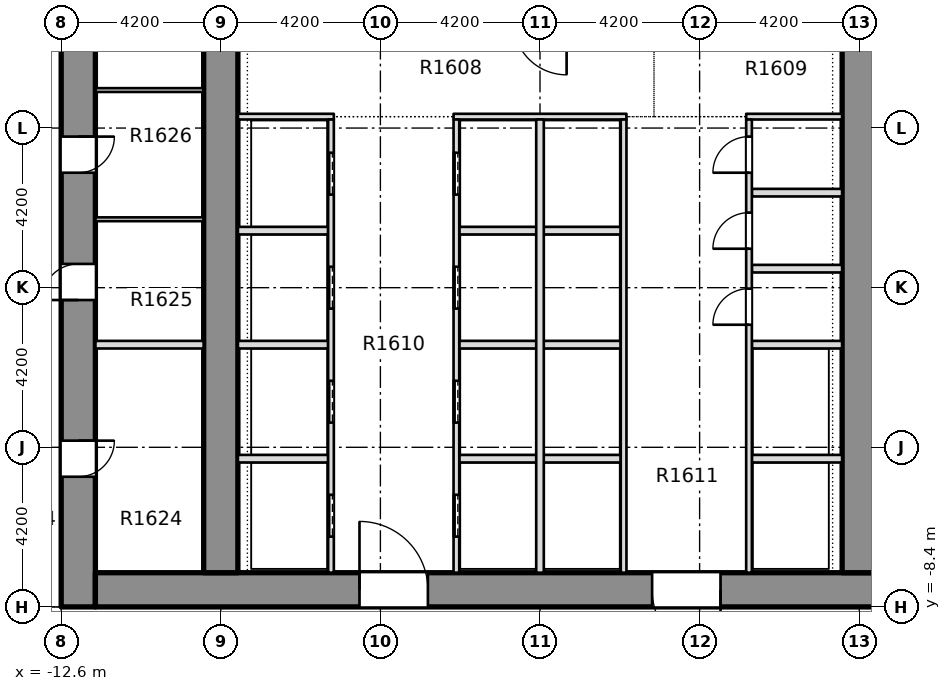
"""IFC4 building model, lengths in metres.
Left out: names, types, materials, properties, quantities, classifications, styles, units other than length and angle.
Written with IfcOpenShell. Run it as: python <this file> out.ifc"""

import sys

from ifc_helpers import new_model, si_unit, direction, frame, frame_2d, origin, place, context, subcontext, project, spatial, rectangle, extrude, element, fill, save


model = new_model("IFC4")
c1 = context("Model", 3, precision=1e-05, world=origin(), true_north=direction((0.0, 1.0)))
c2 = subcontext(c1, "Body", "Model", "MODEL_VIEW")
j1 = project(units=[si_unit("LENGTHUNIT", "METRE"), si_unit("PLANEANGLEUNIT", "RADIAN")], contexts=[c1])
p1 = place(None, origin())
s1 = spatial("IfcSite", under=j1, at=p1, CompositionType="ELEMENT")
p2 = place(p1, origin())
s2 = spatial("IfcBuilding", under=s1, at=p2, CompositionType="ELEMENT")
p3 = place(p2, frame((0.0, 0.0, 69.0)))
s3 = spatial("IfcBuildingStorey", under=s2, at=p3, CompositionType="ELEMENT", Elevation=69.0)
p4 = place(p3, frame((-12.15, -8.4, -0.32), z_axis=(0.0, 0.0, 1.0), x_axis=(0.0, 1.0, 0.0)))
e1 = element("IfcWall", 1, at=p4, inside=s3, PredefinedType="SHEAR", context=c2, shape_type="SweptSolid", body=[
    extrude(rectangle(XDim=30.15, YDim=0.9, at=frame_2d((15.075, 0.0))), origin(), (0.0, 0.0, 1.0), 3.45),
])
p5 = place(p4, frame((3.425, 0.0, 0.32)))
e2 = element("IfcOpeningElement", 2, at=p5, cuts=e1, PredefinedType="OPENING", context=c2, shape_type="SweptSolid", body=[
    extrude(rectangle(XDim=0.95, YDim=2.1, at=frame_2d((0.475, 1.05))), frame((0.0, 0.46, 0.0), z_axis=(0.0, -1.0, 0.0), x_axis=(1.0, 0.0, 0.0)), (0.0, 0.0, 1.0), 0.92),
])
p6 = place(p4, frame((8.075, 0.0, 0.32)))
e3 = element("IfcOpeningElement", 3, at=p6, cuts=e1, PredefinedType="OPENING", context=c2, shape_type="SweptSolid", body=[
    extrude(rectangle(XDim=0.95, YDim=2.1, at=frame_2d((0.475, 1.05))), frame((0.0, 0.46, 0.0), z_axis=(0.0, -1.0, 0.0), x_axis=(1.0, 0.0, 0.0)), (0.0, 0.0, 1.0), 0.92),
])
p7 = place(p4, frame((11.425, 0.0, 0.32)))
e4 = element("IfcOpeningElement", 4, at=p7, cuts=e1, PredefinedType="OPENING", context=c2, shape_type="SweptSolid", body=[
    extrude(rectangle(XDim=0.95, YDim=2.1, at=frame_2d((0.475, 1.05))), frame((0.0, 0.46, 0.0), z_axis=(0.0, -1.0, 0.0), x_axis=(1.0, 0.0, 0.0)), (0.0, 0.0, 1.0), 0.92),
])
p8 = place(p4, frame((15.625, 0.0, 0.32)))
e5 = element("IfcOpeningElement", 5, at=p8, cuts=e1, PredefinedType="OPENING", context=c2, shape_type="SweptSolid", body=[
    extrude(rectangle(XDim=0.95, YDim=2.1, at=frame_2d((0.475, 1.05))), frame((0.0, 0.46, 0.0), z_axis=(0.0, -1.0, 0.0), x_axis=(1.0, 0.0, 0.0)), (0.0, 0.0, 1.0), 0.92),
])
p9 = place(p4, frame((22.725, 0.0, 0.32)))
e6 = element("IfcOpeningElement", 6, at=p9, cuts=e1, PredefinedType="OPENING", context=c2, shape_type="SweptSolid", body=[
    extrude(rectangle(XDim=0.95, YDim=2.1, at=frame_2d((0.475, 1.05))), frame((0.0, 0.46, 0.0), z_axis=(0.0, -1.0, 0.0), x_axis=(1.0, 0.0, 0.0)), (0.0, 0.0, 1.0), 0.92),
])
p10 = place(p4, frame((26.75, 0.0, 0.32)))
e7 = element("IfcOpeningElement", 7, at=p10, cuts=e1, PredefinedType="OPENING", context=c2, shape_type="SweptSolid", body=[
    extrude(rectangle(XDim=0.95, YDim=2.1, at=frame_2d((0.475, 1.05))), frame((0.0, 0.46, 0.0), z_axis=(0.0, -1.0, 0.0), x_axis=(1.0, 0.0, 0.0)), (0.0, 0.0, 1.0), 0.92),
])
p11 = place(p4, frame((19.3, 0.0, 0.32)))
e8 = element("IfcOpeningElement", 8, at=p11, cuts=e1, PredefinedType="OPENING", context=c2, shape_type="SweptSolid", body=[
    extrude(rectangle(XDim=1.2, YDim=2.1, at=frame_2d((0.6, 1.05))), frame((0.0, 0.46, 0.0), z_axis=(0.0, -1.0, 0.0), x_axis=(1.0, 0.0, 0.0)), (0.0, 0.0, 1.0), 0.92),
])
p12 = place(p3, frame((-11.7, -7.95, -0.32), z_axis=(0.0, 0.0, 1.0), x_axis=(1.0, 0.0, 0.0)))
e9 = element("IfcWall", 9, at=p12, inside=s3, PredefinedType="SHEAR", context=c2, shape_type="SweptSolid", body=[
    extrude(rectangle(XDim=23.4, YDim=0.9, at=frame_2d((11.7, 0.0))), origin(), (0.0, 0.0, 1.0), 3.45),
])
p13 = place(p12, frame((6.95, 0.0, 0.32)))
e10 = element("IfcOpeningElement", 10, at=p13, cuts=e9, PredefinedType="OPENING", context=c2, shape_type="SweptSolid", body=[
    extrude(rectangle(XDim=1.8, YDim=2.1, at=frame_2d((0.9, 1.05))), frame((0.0, 0.46, 0.0), z_axis=(0.0, -1.0, 0.0), x_axis=(1.0, 0.0, 0.0)), (0.0, 0.0, 1.0), 0.92),
])
p14 = place(p12, frame((14.65, 0.0, 0.32)))
e11 = element("IfcOpeningElement", 11, at=p14, cuts=e9, PredefinedType="OPENING", context=c2, shape_type="SweptSolid", body=[
    extrude(rectangle(XDim=1.8, YDim=2.1, at=frame_2d((0.9, 1.05))), frame((0.0, 0.46, 0.0), z_axis=(0.0, -1.0, 0.0), x_axis=(1.0, 0.0, 0.0)), (0.0, 0.0, 1.0), 0.92),
])
p15 = place(p3, frame((-8.4, -7.5, -0.32), z_axis=(0.0, 0.0, 1.0), x_axis=(0.0, 1.0, 0.0)))
e12 = element("IfcWall", 12, at=p15, inside=s3, PredefinedType="SHEAR", context=c2, shape_type="SweptSolid", body=[
    extrude(rectangle(XDim=28.35, YDim=0.9, at=frame_2d((14.175, 0.0))), origin(), (0.0, 0.0, 1.0), 3.45),
])
p16 = place(p15, frame((18.4, 0.0, 0.32)))
e13 = element("IfcOpeningElement", 13, at=p16, cuts=e12, PredefinedType="OPENING", context=c2, shape_type="SweptSolid", body=[
    extrude(rectangle(XDim=1.2, YDim=2.1, at=frame_2d((0.6, 1.05))), frame((0.0, 0.46, 0.0), z_axis=(0.0, -1.0, 0.0), x_axis=(1.0, 0.0, 0.0)), (0.0, 0.0, 1.0), 0.92),
])
p17 = place(p3, frame((8.4, -7.5, -0.32), z_axis=(0.0, 0.0, 1.0), x_axis=(0.0, 1.0, 0.0)))
e14 = element("IfcWall", 14, at=p17, inside=s3, PredefinedType="SHEAR", context=c2, shape_type="SweptSolid", body=[
    extrude(rectangle(XDim=28.35, YDim=0.9, at=frame_2d((14.175, 0.0))), origin(), (0.0, 0.0, 1.0), 3.45),
])
p18 = place(p17, frame((18.4, 0.0, 0.32)))
e15 = element("IfcOpeningElement", 15, at=p18, cuts=e14, PredefinedType="OPENING", context=c2, shape_type="SweptSolid", body=[
    extrude(rectangle(XDim=1.2, YDim=2.1, at=frame_2d((0.6, 1.05))), frame((0.0, 0.46, 0.0), z_axis=(0.0, -1.0, 0.0), x_axis=(1.0, 0.0, 0.0)), (0.0, 0.0, 1.0), 0.92),
])
p19 = place(p3, frame((-7.949, -4.5, 0.0), z_axis=(0.0, 0.0, 1.0), x_axis=(1.0, 0.0, 0.0)))
e16 = element("IfcWall", 16, at=p19, inside=s3, PredefinedType="PARTITIONING", context=c2, shape_type="SweptSolid", body=[
    extrude(rectangle(XDim=2.374, YDim=0.2, at=frame_2d((1.187, 0.0))), origin(), (0.0, 0.0, 1.0), 3.13),
])
p20 = place(p3, frame((-2.125, -4.5, 0.0), z_axis=(0.0, 0.0, 1.0), x_axis=(1.0, 0.0, 0.0)))
e17 = element("IfcWall", 17, at=p20, inside=s3, PredefinedType="PARTITIONING", context=c2, shape_type="SweptSolid", body=[
    extrude(rectangle(XDim=4.25, YDim=0.2, at=frame_2d((2.125, 0.0))), origin(), (0.0, 0.0, 1.0), 3.13),
])
for number, where, z_axis, x_axis in (
    (18, (5.575, -4.5, 0.0), (0.0, 0.0, 1.0), (1.0, 0.0, 0.0)),
    (19, (-7.949, -1.5, 0.0), (0.0, 0.0, 1.0), (1.0, 0.0, 0.0)),
):
    element("IfcWall", number, at=place(p3, frame(where, z_axis=z_axis, x_axis=x_axis)), inside=s3, PredefinedType="PARTITIONING", context=c2, shape_type="SweptSolid", body=[
        extrude(rectangle(XDim=2.374, YDim=0.2, at=frame_2d((1.187, 0.0))), origin(), (0.0, 0.0, 1.0), 3.13),
    ])
p21 = place(p3, frame((-2.125, -1.5, 0.0), z_axis=(0.0, 0.0, 1.0), x_axis=(1.0, 0.0, 0.0)))
e20 = element("IfcWall", 20, at=p21, inside=s3, PredefinedType="PARTITIONING", context=c2, shape_type="SweptSolid", body=[
    extrude(rectangle(XDim=4.25, YDim=0.2, at=frame_2d((2.125, 0.0))), origin(), (0.0, 0.0, 1.0), 3.13),
])
for number, where, z_axis, x_axis in (
    (21, (5.575, -1.5, 0.0), (0.0, 0.0, 1.0), (1.0, 0.0, 0.0)),
    (22, (5.575, 0.5, 0.0), (0.0, 0.0, 1.0), (1.0, 0.0, 0.0)),
    (23, (-7.949, 1.5, 0.0), (0.0, 0.0, 1.0), (1.0, 0.0, 0.0)),
):
    element("IfcWall", number, at=place(p3, frame(where, z_axis=z_axis, x_axis=x_axis)), inside=s3, PredefinedType="PARTITIONING", context=c2, shape_type="SweptSolid", body=[
        extrude(rectangle(XDim=2.374, YDim=0.2, at=frame_2d((1.187, 0.0))), origin(), (0.0, 0.0, 1.0), 3.13),
    ])
p22 = place(p3, frame((-2.125, 1.5, 0.0), z_axis=(0.0, 0.0, 1.0), x_axis=(1.0, 0.0, 0.0)))
e24 = element("IfcWall", 24, at=p22, inside=s3, PredefinedType="PARTITIONING", context=c2, shape_type="SweptSolid", body=[
    extrude(rectangle(XDim=4.25, YDim=0.2, at=frame_2d((2.125, 0.0))), origin(), (0.0, 0.0, 1.0), 3.13),
])
p23 = place(p3, frame((5.575, 2.5, 0.0), z_axis=(0.0, 0.0, 1.0), x_axis=(1.0, 0.0, 0.0)))
e25 = element("IfcWall", 25, at=p23, inside=s3, PredefinedType="PARTITIONING", context=c2, shape_type="SweptSolid", body=[
    extrude(rectangle(XDim=2.374, YDim=0.2, at=frame_2d((1.187, 0.0))), origin(), (0.0, 0.0, 1.0), 3.13),
])
p24 = place(p3, frame((-7.949, 4.5, 0.0), z_axis=(0.0, 0.0, 1.0), x_axis=(1.0, 0.0, 0.0)))
e26 = element("IfcWall", 26, at=p24, inside=s3, PredefinedType="PARTITIONING", context=c2, shape_type="SweptSolid", body=[
    extrude(rectangle(XDim=2.524, YDim=0.15, at=frame_2d((1.262, 0.0))), origin(), (0.0, 0.0, 1.0), 3.13),
])
p25 = place(p3, frame((-2.275, 4.5, 0.0), z_axis=(0.0, 0.0, 1.0), x_axis=(1.0, 0.0, 0.0)))
e27 = element("IfcWall", 27, at=p25, inside=s3, PredefinedType="PARTITIONING", context=c2, shape_type="SweptSolid", body=[
    extrude(rectangle(XDim=4.55, YDim=0.15, at=frame_2d((2.275, 0.0))), origin(), (0.0, 0.0, 1.0), 3.13),
])
p26 = place(p3, frame((5.425, 4.5, 0.0), z_axis=(0.0, 0.0, 1.0), x_axis=(1.0, 0.0, 0.0)))
e28 = element("IfcWall", 28, at=p26, inside=s3, PredefinedType="PARTITIONING", context=c2, shape_type="SweptSolid", body=[
    extrude(rectangle(XDim=2.524, YDim=0.15, at=frame_2d((1.262, 0.0))), origin(), (0.0, 0.0, 1.0), 3.13),
])
p27 = place(p3, frame((-5.5, -7.499, 0.0), z_axis=(0.0, 0.0, 1.0), x_axis=(0.0, 1.0, 0.0)))
e29 = element("IfcWall", 29, at=p27, inside=s3, PredefinedType="PARTITIONING", context=c2, shape_type="SweptSolid", body=[
    extrude(rectangle(XDim=11.924, YDim=0.15, at=frame_2d((5.962, 0.0))), origin(), (0.0, 0.0, 1.0), 3.13),
])
p28 = place(p27, frame((0.949, 0.0, 0.0)))
e30 = element("IfcOpeningElement", 30, at=p28, cuts=e29, PredefinedType="OPENING", context=c2, shape_type="SweptSolid", body=[
    extrude(rectangle(XDim=1.1, YDim=2.1, at=frame_2d((0.55, 1.05))), frame((0.0, 0.085, 0.0), z_axis=(0.0, -1.0, 0.0), x_axis=(1.0, 0.0, 0.0)), (0.0, 0.0, 1.0), 0.17),
])
p29 = place(p27, frame((3.949, 0.0, 0.0)))
e31 = element("IfcOpeningElement", 31, at=p29, cuts=e29, PredefinedType="OPENING", context=c2, shape_type="SweptSolid", body=[
    extrude(rectangle(XDim=1.1, YDim=2.1, at=frame_2d((0.55, 1.05))), frame((0.0, 0.085, 0.0), z_axis=(0.0, -1.0, 0.0), x_axis=(1.0, 0.0, 0.0)), (0.0, 0.0, 1.0), 0.17),
])
p30 = place(p27, frame((6.949, 0.0, 0.0)))
e32 = element("IfcOpeningElement", 32, at=p30, cuts=e29, PredefinedType="OPENING", context=c2, shape_type="SweptSolid", body=[
    extrude(rectangle(XDim=1.1, YDim=2.1, at=frame_2d((0.55, 1.05))), frame((0.0, 0.085, 0.0), z_axis=(0.0, -1.0, 0.0), x_axis=(1.0, 0.0, 0.0)), (0.0, 0.0, 1.0), 0.17),
])
p31 = place(p27, frame((9.949, 0.0, 0.0)))
e33 = element("IfcOpeningElement", 33, at=p31, cuts=e29, PredefinedType="OPENING", context=c2, shape_type="SweptSolid", body=[
    extrude(rectangle(XDim=1.1, YDim=2.1, at=frame_2d((0.55, 1.05))), frame((0.0, 0.085, 0.0), z_axis=(0.0, -1.0, 0.0), x_axis=(1.0, 0.0, 0.0)), (0.0, 0.0, 1.0), 0.17),
])
p32 = place(p3, frame((-2.2, -7.499, 0.0), z_axis=(0.0, 0.0, 1.0), x_axis=(0.0, 1.0, 0.0)))
e34 = element("IfcWall", 34, at=p32, inside=s3, PredefinedType="PARTITIONING", context=c2, shape_type="SweptSolid", body=[
    extrude(rectangle(XDim=11.924, YDim=0.15, at=frame_2d((5.962, 0.0))), origin(), (0.0, 0.0, 1.0), 3.13),
])
p33 = place(p32, frame((0.949, 0.0, 0.0)))
e35 = element("IfcOpeningElement", 35, at=p33, cuts=e34, PredefinedType="OPENING", context=c2, shape_type="SweptSolid", body=[
    extrude(rectangle(XDim=1.1, YDim=2.1, at=frame_2d((0.55, 1.05))), frame((0.0, 0.085, 0.0), z_axis=(0.0, -1.0, 0.0), x_axis=(1.0, 0.0, 0.0)), (0.0, 0.0, 1.0), 0.17),
])
p34 = place(p32, frame((3.949, 0.0, 0.0)))
e36 = element("IfcOpeningElement", 36, at=p34, cuts=e34, PredefinedType="OPENING", context=c2, shape_type="SweptSolid", body=[
    extrude(rectangle(XDim=1.1, YDim=2.1, at=frame_2d((0.55, 1.05))), frame((0.0, 0.085, 0.0), z_axis=(0.0, -1.0, 0.0), x_axis=(1.0, 0.0, 0.0)), (0.0, 0.0, 1.0), 0.17),
])
p35 = place(p32, frame((6.949, 0.0, 0.0)))
e37 = element("IfcOpeningElement", 37, at=p35, cuts=e34, PredefinedType="OPENING", context=c2, shape_type="SweptSolid", body=[
    extrude(rectangle(XDim=1.1, YDim=2.1, at=frame_2d((0.55, 1.05))), frame((0.0, 0.085, 0.0), z_axis=(0.0, -1.0, 0.0), x_axis=(1.0, 0.0, 0.0)), (0.0, 0.0, 1.0), 0.17),
])
p36 = place(p32, frame((9.949, 0.0, 0.0)))
e38 = element("IfcOpeningElement", 38, at=p36, cuts=e34, PredefinedType="OPENING", context=c2, shape_type="SweptSolid", body=[
    extrude(rectangle(XDim=1.1, YDim=2.1, at=frame_2d((0.55, 1.05))), frame((0.0, 0.085, 0.0), z_axis=(0.0, -1.0, 0.0), x_axis=(1.0, 0.0, 0.0)), (0.0, 0.0, 1.0), 0.17),
])
p37 = place(p3, frame((0.0, -7.499, 0.0), z_axis=(0.0, 0.0, 1.0), x_axis=(0.0, 1.0, 0.0)))
e39 = element("IfcWall", 39, at=p37, inside=s3, PredefinedType="PARTITIONING", context=c2, shape_type="SweptSolid", body=[
    extrude(rectangle(XDim=11.924, YDim=0.2, at=frame_2d((5.962, 0.0))), origin(), (0.0, 0.0, 1.0), 3.13),
])
p38 = place(p3, frame((2.2, -7.499, 0.0), z_axis=(0.0, 0.0, 1.0), x_axis=(0.0, 1.0, 0.0)))
e40 = element("IfcWall", 40, at=p38, inside=s3, PredefinedType="PARTITIONING", context=c2, shape_type="SweptSolid", body=[
    extrude(rectangle(XDim=11.924, YDim=0.15, at=frame_2d((5.962, 0.0))), origin(), (0.0, 0.0, 1.0), 3.13),
])
p39 = place(p3, frame((5.5, -7.499, 0.0), z_axis=(0.0, 0.0, 1.0), x_axis=(0.0, 1.0, 0.0)))
e41 = element("IfcWall", 41, at=p39, inside=s3, PredefinedType="PARTITIONING", context=c2, shape_type="SweptSolid", body=[
    extrude(rectangle(XDim=11.924, YDim=0.15, at=frame_2d((5.962, 0.0))), origin(), (0.0, 0.0, 1.0), 3.13),
])
p40 = place(p39, frame((6.524, 0.0, 0.0)))
e42 = element("IfcOpeningElement", 42, at=p40, cuts=e41, PredefinedType="OPENING", context=c2, shape_type="SweptSolid", body=[
    extrude(rectangle(XDim=0.95, YDim=2.1, at=frame_2d((0.475, 1.05))), frame((0.0, 0.085, 0.0), z_axis=(0.0, -1.0, 0.0), x_axis=(1.0, 0.0, 0.0)), (0.0, 0.0, 1.0), 0.17),
])
p41 = place(p39, frame((8.524, 0.0, 0.0)))
e43 = element("IfcOpeningElement", 43, at=p41, cuts=e41, PredefinedType="OPENING", context=c2, shape_type="SweptSolid", body=[
    extrude(rectangle(XDim=0.95, YDim=2.1, at=frame_2d((0.475, 1.05))), frame((0.0, 0.085, 0.0), z_axis=(0.0, -1.0, 0.0), x_axis=(1.0, 0.0, 0.0)), (0.0, 0.0, 1.0), 0.17),
])
p42 = place(p39, frame((10.524, 0.0, 0.0)))
e44 = element("IfcOpeningElement", 44, at=p42, cuts=e41, PredefinedType="OPENING", context=c2, shape_type="SweptSolid", body=[
    extrude(rectangle(XDim=0.95, YDim=2.1, at=frame_2d((0.475, 1.05))), frame((0.0, 0.085, 0.0), z_axis=(0.0, -1.0, 0.0), x_axis=(1.0, 0.0, 0.0)), (0.0, 0.0, 1.0), 0.17),
])
p43 = place(p3, frame((-11.699, -1.5, 0.0), z_axis=(0.0, 0.0, 1.0), x_axis=(1.0, 0.0, 0.0)))
e45 = element("IfcWall", 45, at=p43, inside=s3, PredefinedType="PARTITIONING", context=c2, shape_type="SweptSolid", body=[
    extrude(rectangle(XDim=2.848, YDim=0.2, at=frame_2d((1.424, 0.0))), origin(), (0.0, 0.0, 1.0), 3.13),
])
for number, where, z_axis, x_axis in (
    (46, (-11.699, 1.8, 0.0), (0.0, 0.0, 1.0), (1.0, 0.0, 0.0)),
    (47, (-11.699, 5.2, 0.0), (0.0, 0.0, 1.0), (1.0, 0.0, 0.0)),
):
    element("IfcWall", number, at=place(p3, frame(where, z_axis=z_axis, x_axis=x_axis)), inside=s3, PredefinedType="PARTITIONING", context=c2, shape_type="SweptSolid", body=[
        extrude(rectangle(XDim=2.848, YDim=0.1, at=frame_2d((1.424, 0.0))), origin(), (0.0, 0.0, 1.0), 3.13),
    ])
p44 = place(p28, origin())
e48 = element("IfcDoor", 48, at=p44, inside=s3, OperationType="SLIDING_TO_RIGHT", PredefinedType="DOOR", context=c2, shape_type="SweptSolid", body=[
    extrude(rectangle(XDim=1.1, YDim=2.1, at=frame_2d((0.55, 1.05))), frame((0.0, 0.025, 0.0), z_axis=(0.0, -1.0, 0.0), x_axis=(1.0, 0.0, 0.0)), (0.0, 0.0, 1.0), 0.05),
])
fill(e30, e48)
p45 = place(p29, origin())
e49 = element("IfcDoor", 49, at=p45, inside=s3, OperationType="SLIDING_TO_RIGHT", PredefinedType="DOOR", context=c2, shape_type="SweptSolid", body=[
    extrude(rectangle(XDim=1.1, YDim=2.1, at=frame_2d((0.55, 1.05))), frame((0.0, 0.025, 0.0), z_axis=(0.0, -1.0, 0.0), x_axis=(1.0, 0.0, 0.0)), (0.0, 0.0, 1.0), 0.05),
])
fill(e31, e49)
p46 = place(p30, origin())
e50 = element("IfcDoor", 50, at=p46, inside=s3, OperationType="SLIDING_TO_RIGHT", PredefinedType="DOOR", context=c2, shape_type="SweptSolid", body=[
    extrude(rectangle(XDim=1.1, YDim=2.1, at=frame_2d((0.55, 1.05))), frame((0.0, 0.025, 0.0), z_axis=(0.0, -1.0, 0.0), x_axis=(1.0, 0.0, 0.0)), (0.0, 0.0, 1.0), 0.05),
])
fill(e32, e50)
p47 = place(p31, origin())
e51 = element("IfcDoor", 51, at=p47, inside=s3, OperationType="SLIDING_TO_RIGHT", PredefinedType="DOOR", context=c2, shape_type="SweptSolid", body=[
    extrude(rectangle(XDim=1.1, YDim=2.1, at=frame_2d((0.55, 1.05))), frame((0.0, 0.025, 0.0), z_axis=(0.0, -1.0, 0.0), x_axis=(1.0, 0.0, 0.0)), (0.0, 0.0, 1.0), 0.05),
])
fill(e33, e51)
p48 = place(p33, origin())
e52 = element("IfcDoor", 52, at=p48, inside=s3, OperationType="SLIDING_TO_RIGHT", PredefinedType="DOOR", context=c2, shape_type="SweptSolid", body=[
    extrude(rectangle(XDim=1.1, YDim=2.1, at=frame_2d((0.55, 1.05))), frame((0.0, 0.025, 0.0), z_axis=(0.0, -1.0, 0.0), x_axis=(1.0, 0.0, 0.0)), (0.0, 0.0, 1.0), 0.05),
])
fill(e35, e52)
p49 = place(p34, origin())
e53 = element("IfcDoor", 53, at=p49, inside=s3, OperationType="SLIDING_TO_RIGHT", PredefinedType="DOOR", context=c2, shape_type="SweptSolid", body=[
    extrude(rectangle(XDim=1.1, YDim=2.1, at=frame_2d((0.55, 1.05))), frame((0.0, 0.025, 0.0), z_axis=(0.0, -1.0, 0.0), x_axis=(1.0, 0.0, 0.0)), (0.0, 0.0, 1.0), 0.05),
])
fill(e36, e53)
p50 = place(p35, origin())
e54 = element("IfcDoor", 54, at=p50, inside=s3, OperationType="SLIDING_TO_RIGHT", PredefinedType="DOOR", context=c2, shape_type="SweptSolid", body=[
    extrude(rectangle(XDim=1.1, YDim=2.1, at=frame_2d((0.55, 1.05))), frame((0.0, 0.025, 0.0), z_axis=(0.0, -1.0, 0.0), x_axis=(1.0, 0.0, 0.0)), (0.0, 0.0, 1.0), 0.05),
])
fill(e37, e54)
p51 = place(p36, origin())
e55 = element("IfcDoor", 55, at=p51, inside=s3, OperationType="SLIDING_TO_RIGHT", PredefinedType="DOOR", context=c2, shape_type="SweptSolid", body=[
    extrude(rectangle(XDim=1.1, YDim=2.1, at=frame_2d((0.55, 1.05))), frame((0.0, 0.025, 0.0), z_axis=(0.0, -1.0, 0.0), x_axis=(1.0, 0.0, 0.0)), (0.0, 0.0, 1.0), 0.05),
])
fill(e38, e55)
p52 = place(p40, origin())
e56 = element("IfcDoor", 56, at=p52, inside=s3, OperationType="SINGLE_SWING_RIGHT", PredefinedType="DOOR", context=c2, shape_type="SweptSolid", body=[
    extrude(rectangle(XDim=0.95, YDim=2.1, at=frame_2d((0.475, 1.05))), frame((0.0, 0.025, 0.0), z_axis=(0.0, -1.0, 0.0), x_axis=(1.0, 0.0, 0.0)), (0.0, 0.0, 1.0), 0.05),
])
fill(e42, e56)
p53 = place(p41, origin())
e57 = element("IfcDoor", 57, at=p53, inside=s3, OperationType="SINGLE_SWING_LEFT", PredefinedType="DOOR", context=c2, shape_type="SweptSolid", body=[
    extrude(rectangle(XDim=0.95, YDim=2.1, at=frame_2d((0.475, 1.05))), frame((0.0, 0.025, 0.0), z_axis=(0.0, -1.0, 0.0), x_axis=(1.0, 0.0, 0.0)), (0.0, 0.0, 1.0), 0.05),
])
fill(e43, e57)
p54 = place(p42, origin())
e58 = element("IfcDoor", 58, at=p54, inside=s3, OperationType="SINGLE_SWING_RIGHT", PredefinedType="DOOR", context=c2, shape_type="SweptSolid", body=[
    extrude(rectangle(XDim=0.95, YDim=2.1, at=frame_2d((0.475, 1.05))), frame((0.0, 0.025, 0.0), z_axis=(0.0, -1.0, 0.0), x_axis=(1.0, 0.0, 0.0)), (0.0, 0.0, 1.0), 0.05),
])
fill(e44, e58)
p55 = place(p13, origin())
e59 = element("IfcDoor", 59, at=p55, inside=s3, OperationType="SINGLE_SWING_LEFT", PredefinedType="DOOR", context=c2, shape_type="SweptSolid", body=[
    extrude(rectangle(XDim=1.8, YDim=2.1, at=frame_2d((0.9, 1.05))), frame((0.0, 0.025, 0.0), z_axis=(0.0, -1.0, 0.0), x_axis=(1.0, 0.0, 0.0)), (0.0, 0.0, 1.0), 0.05),
])
fill(e10, e59)
p56 = place(p14, origin())
e60 = element("IfcDoor", 60, at=p56, inside=s3, OperationType="SINGLE_SWING_LEFT", PredefinedType="DOOR", context=c2, shape_type="SweptSolid", body=[
    extrude(rectangle(XDim=1.8, YDim=2.1, at=frame_2d((0.9, 1.05))), frame((0.0, 0.025, 0.0), z_axis=(0.0, -1.0, 0.0), x_axis=(1.0, 0.0, 0.0)), (0.0, 0.0, 1.0), 0.05),
])
fill(e11, e60)
p57 = place(p5, origin())
e61 = element("IfcDoor", 61, at=p57, inside=s3, OperationType="SINGLE_SWING_LEFT", PredefinedType="DOOR", context=c2, shape_type="SweptSolid", body=[
    extrude(rectangle(XDim=0.95, YDim=2.1, at=frame_2d((0.475, 1.05))), frame((0.0, 0.025, 0.0), z_axis=(0.0, -1.0, 0.0), x_axis=(1.0, 0.0, 0.0)), (0.0, 0.0, 1.0), 0.05),
])
fill(e2, e61)
p58 = place(p6, origin())
e62 = element("IfcDoor", 62, at=p58, inside=s3, OperationType="SINGLE_SWING_LEFT", PredefinedType="DOOR", context=c2, shape_type="SweptSolid", body=[
    extrude(rectangle(XDim=0.95, YDim=2.1, at=frame_2d((0.475, 1.05))), frame((0.0, 0.025, 0.0), z_axis=(0.0, -1.0, 0.0), x_axis=(1.0, 0.0, 0.0)), (0.0, 0.0, 1.0), 0.05),
])
fill(e3, e62)
p59 = place(p7, origin())
e63 = element("IfcDoor", 63, at=p59, inside=s3, OperationType="SINGLE_SWING_LEFT", PredefinedType="DOOR", context=c2, shape_type="SweptSolid", body=[
    extrude(rectangle(XDim=0.95, YDim=2.1, at=frame_2d((0.475, 1.05))), frame((0.0, 0.025, 0.0), z_axis=(0.0, -1.0, 0.0), x_axis=(1.0, 0.0, 0.0)), (0.0, 0.0, 1.0), 0.05),
])
fill(e4, e63)
save(model, sys.argv[1])
